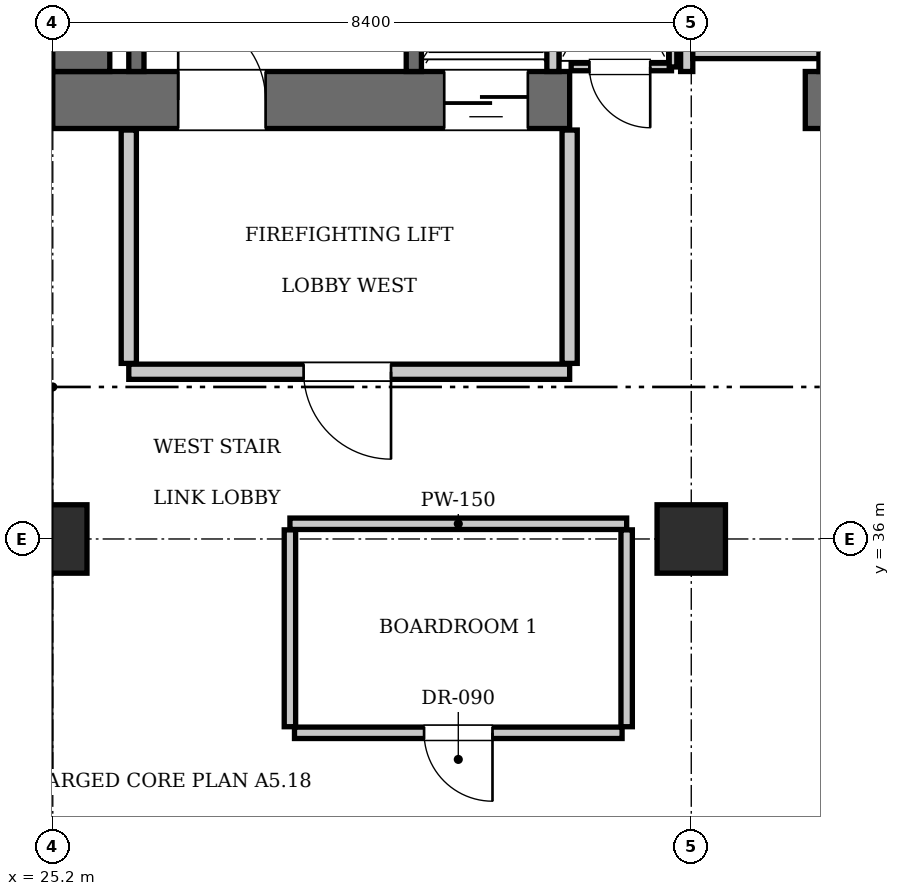
"""IFC4 building model, lengths in metres.
Left out: names, types, materials, properties, quantities, classifications, styles, units other than length and angle.
Written with IfcOpenShell. Run it as: python <this file> out.ifc"""

import sys

from ifc_helpers import new_model, si_unit, direction, frame, frame_2d, origin, origin_2d, place, context, subcontext, project, spatial, rectangle, extrude, element, fill, save


model = new_model("IFC4")
c1 = context("Model", 3, precision=1e-05, world=origin(), true_north=direction((0.0, 1.0)))
c2 = subcontext(c1, "Body", "Model", "MODEL_VIEW")
j1 = project(units=[si_unit("LENGTHUNIT", "METRE"), si_unit("PLANEANGLEUNIT", "RADIAN")], contexts=[c1])
p1 = place(None, origin())
s1 = spatial("IfcSite", under=j1, at=p1, CompositionType="ELEMENT")
p2 = place(p1, origin())
s2 = spatial("IfcBuilding", under=s1, at=p2, CompositionType="ELEMENT")
p3 = place(p2, frame((0.0, 0.0, 212.1)))
s3 = spatial("IfcBuildingStorey", under=s2, at=p3, CompositionType="ELEMENT", Elevation=212.1)
p4 = place(p3, frame((25.2, 41.775, 0.0), z_axis=(0.0, 0.0, 1.0), x_axis=(1.0, 0.0, 0.0)))
e1 = element("IfcWall", 1, at=p4, inside=s3, PredefinedType="SHEAR", context=c2, shape_type="SweptSolid", body=[
    extrude(rectangle(XDim=6.8, YDim=0.75, at=frame_2d((3.4, 0.0))), origin(), (0.0, 0.0, 1.0), 3.85),
])
p5 = place(p4, frame((1.65, 0.0, 0.0)))
e2 = element("IfcOpeningElement", 2, at=p5, cuts=e1, PredefinedType="OPENING", context=c2, shape_type="SweptSolid", body=[
    extrude(rectangle(XDim=1.15, YDim=2.15, at=frame_2d((0.575, 1.075))), frame((0.0, 0.385, 0.0), z_axis=(0.0, -1.0, 0.0), x_axis=(1.0, 0.0, 0.0)), (0.0, 0.0, 1.0), 0.77),
])
p6 = place(p4, frame((5.15, 0.0, 0.0)))
e3 = element("IfcOpeningElement", 3, at=p6, cuts=e1, PredefinedType="OPENING", context=c2, shape_type="SweptSolid", body=[
    extrude(rectangle(XDim=1.1, YDim=2.2, at=frame_2d((0.55, 1.1))), frame((0.0, 0.385, 0.0), z_axis=(0.0, -1.0, 0.0), x_axis=(1.0, 0.0, 0.0)), (0.0, 0.0, 1.0), 0.77),
])
p7 = place(p3, frame((35.1, 41.775, 0.0), z_axis=(0.0, 0.0, 1.0), x_axis=(1.0, 0.0, 0.0)))
e4 = element("IfcWall", 4, at=p7, inside=s3, PredefinedType="SHEAR", context=c2, shape_type="SweptSolid", body=[
    extrude(rectangle(XDim=5.4, YDim=0.75, at=frame_2d((2.7, 0.0))), origin(), (0.0, 0.0, 1.0), 3.85),
])
p8 = place(p3, frame((25.575, 42.15, 0.0), z_axis=(0.0, 0.0, 1.0), x_axis=(0.0, 1.0, 0.0)))
e5 = element("IfcWall", 5, at=p8, inside=s3, PredefinedType="SHEAR", context=c2, shape_type="SweptSolid", body=[
    extrude(rectangle(XDim=1.9, YDim=0.75, at=frame_2d((0.95, 0.0))), origin(), (0.0, 0.0, 1.0), 3.85),
])
for number, where, z_axis, x_axis in (
    (6, (25.2, 36.0, 0.0), (0.0, 0.0, 1.0), (1.0, 0.0, 0.0)),
    (7, (33.6, 36.0, 0.0), (0.0, 0.0, 1.0), (1.0, 0.0, 0.0)),
):
    element("IfcColumn", number, at=place(p3, frame(where, z_axis=z_axis, x_axis=x_axis)), inside=s3, PredefinedType="COLUMN", context=c2, shape_type="SweptSolid", body=[
        extrude(rectangle(XDim=0.9, YDim=0.9, at=origin_2d()), origin(), (0.0, 0.0, 1.0), 3.85),
    ])
p9 = place(p3, frame((29.95, 42.15, 0.0), z_axis=(0.0, 0.0, 1.0), x_axis=(0.0, 1.0, 0.0)))
e8 = element("IfcWall", 8, at=p9, inside=s3, PredefinedType="SOLIDWALL", context=c2, shape_type="SweptSolid", body=[
    extrude(rectangle(XDim=9.0, YDim=0.2, at=frame_2d((4.5, 0.0))), origin(), (0.0, 0.0, 1.0), 3.61),
])
p10 = place(p3, frame((26.3, 42.15, 0.0), z_axis=(0.0, 0.0, 1.0), x_axis=(0.0, 1.0, 0.0)))
e9 = element("IfcWall", 9, at=p10, inside=s3, PredefinedType="SOLIDWALL", context=c2, shape_type="SweptSolid", body=[
    extrude(rectangle(XDim=1.87, YDim=0.2, at=frame_2d((0.935, 0.0))), origin(), (0.0, 0.0, 1.0), 3.61),
])
p11 = place(p3, frame((31.78, 42.15, 0.0), z_axis=(0.0, 0.0, 1.0), x_axis=(0.0, 1.0, 0.0)))
e10 = element("IfcWall", 10, at=p11, inside=s3, PredefinedType="SOLIDWALL", context=c2, shape_type="SweptSolid", body=[
    extrude(rectangle(XDim=2.59, YDim=0.16, at=frame_2d((1.295, 0.0))), origin(), (0.0, 0.0, 1.0), 3.61),
])
for number, where, z_axis, x_axis in (
    (11, (33.54, 42.15, 0.0), (0.0, 0.0, 1.0), (0.0, 1.0, 0.0)),
    (12, (35.36, 42.15, 0.0), (0.0, 0.0, 1.0), (0.0, 1.0, 0.0)),
):
    element("IfcWall", number, at=place(p3, frame(where, z_axis=z_axis, x_axis=x_axis)), inside=s3, PredefinedType="SOLIDWALL", context=c2, shape_type="SweptSolid", body=[
        extrude(rectangle(XDim=2.25, YDim=0.16, at=frame_2d((1.125, 0.0))), origin(), (0.0, 0.0, 1.0), 3.61),
    ])
p12 = place(p3, frame((33.62, 42.4, 0.0), z_axis=(0.0, 0.0, 1.0), x_axis=(1.0, 0.0, 0.0)))
e13 = element("IfcWall", 13, at=p12, inside=s3, PredefinedType="SOLIDWALL", context=c2, shape_type="SweptSolid", body=[
    extrude(rectangle(XDim=1.66, YDim=0.16, at=frame_2d((0.83, 0.0))), origin(), (0.0, 0.0, 1.0), 3.61),
])
p13 = place(p3, frame((26.2, 38.2, 0.0), z_axis=(0.0, 0.0, 1.0), x_axis=(1.0, 0.0, 0.0)))
e14 = element("IfcWall", 14, at=p13, inside=s3, PredefinedType="PARTITIONING", context=c2, shape_type="SweptSolid", body=[
    extrude(rectangle(XDim=5.8, YDim=0.2, at=frame_2d((2.9, 0.0))), origin(), (0.0, 0.0, 1.0), 3.61),
])
p14 = place(p13, frame((2.3, 0.0, 0.0)))
e15 = element("IfcOpeningElement", 15, at=p14, cuts=e14, PredefinedType="OPENING", context=c2, shape_type="SweptSolid", body=[
    extrude(rectangle(XDim=1.15, YDim=2.15, at=frame_2d((0.575, 1.075))), frame((0.0, 0.11, 0.0), z_axis=(0.0, -1.0, 0.0), x_axis=(1.0, 0.0, 0.0)), (0.0, 0.0, 1.0), 0.22),
])
for number, where, z_axis, x_axis in (
    (16, (26.2, 38.31, 0.0), (0.0, 0.0, 1.0), (0.0, 1.0, 0.0)),
    (17, (32.0, 38.31, 0.0), (0.0, 0.0, 1.0), (0.0, 1.0, 0.0)),
):
    element("IfcWall", number, at=place(p3, frame(where, z_axis=z_axis, x_axis=x_axis)), inside=s3, PredefinedType="PARTITIONING", context=c2, shape_type="SweptSolid", body=[
        extrude(rectangle(XDim=3.07, YDim=0.2, at=frame_2d((1.535, 0.0))), origin(), (0.0, 0.0, 1.0), 3.61),
    ])
p15 = place(p3, frame((32.02, 42.21, 0.0), z_axis=(0.0, 0.0, 1.0), x_axis=(1.0, 0.0, 0.0)))
e18 = element("IfcWall", 18, at=p15, inside=s3, PredefinedType="PARTITIONING", context=c2, shape_type="SweptSolid", body=[
    extrude(rectangle(XDim=1.32, YDim=0.1, at=frame_2d((0.66, 0.0))), origin(), (0.0, 0.0, 1.0), 3.61),
])
p16 = place(p15, frame((0.24, 0.0, 0.0)))
e19 = element("IfcOpeningElement", 19, at=p16, cuts=e18, PredefinedType="OPENING", context=c2, shape_type="SweptSolid", body=[
    extrude(rectangle(XDim=0.8, YDim=2.05, at=frame_2d((0.4, 1.025))), frame((0.0, 0.06, 0.0), z_axis=(0.0, -1.0, 0.0), x_axis=(1.0, 0.0, 0.0)), (0.0, 0.0, 1.0), 0.12),
])
p17 = place(p3, frame((33.36, 42.21, 0.0), z_axis=(0.0, 0.0, 1.0), x_axis=(0.0, 1.0, 0.0)))
e20 = element("IfcWall", 20, at=p17, inside=s3, PredefinedType="PARTITIONING", context=c2, shape_type="SweptSolid", body=[
    extrude(rectangle(XDim=2.73, YDim=0.1, at=frame_2d((1.365, 0.0))), origin(), (0.0, 0.0, 1.0), 3.61),
])
p18 = place(p3, frame((28.32, 36.2, 0.0), z_axis=(0.0, 0.0, 1.0), x_axis=(1.0, 0.0, 0.0)))
e21 = element("IfcWall", 21, at=p18, inside=s3, PredefinedType="PARTITIONING", context=c2, shape_type="SweptSolid", body=[
    extrude(rectangle(XDim=4.43, YDim=0.15, at=frame_2d((2.215, 0.0))), origin(), (0.0, 0.0, 1.0), 3.61),
])
for number, where, z_axis, x_axis in (
    (22, (28.32, 33.53, 0.0), (0.0, 0.0, 1.0), (0.0, 1.0, 0.0)),
    (23, (32.75, 33.53, 0.0), (0.0, 0.0, 1.0), (0.0, 1.0, 0.0)),
):
    element("IfcWall", number, at=place(p3, frame(where, z_axis=z_axis, x_axis=x_axis)), inside=s3, PredefinedType="PARTITIONING", context=c2, shape_type="SweptSolid", body=[
        extrude(rectangle(XDim=2.59, YDim=0.15, at=frame_2d((1.295, 0.0))), origin(), (0.0, 0.0, 1.0), 3.61),
    ])
p19 = place(p3, frame((28.38, 33.45, 0.0), z_axis=(0.0, 0.0, 1.0), x_axis=(1.0, 0.0, 0.0)))
e24 = element("IfcWall", 24, at=p19, inside=s3, PredefinedType="PARTITIONING", context=c2, shape_type="SweptSolid", body=[
    extrude(rectangle(XDim=4.31, YDim=0.15, at=frame_2d((2.155, 0.0))), origin(), (0.0, 0.0, 1.0), 3.61),
])
p20 = place(p19, frame((1.705, 0.0, 0.0)))
e25 = element("IfcOpeningElement", 25, at=p20, cuts=e24, PredefinedType="OPENING", context=c2, shape_type="SweptSolid", body=[
    extrude(rectangle(XDim=0.9, YDim=2.1, at=frame_2d((0.45, 1.05))), frame((0.0, 0.085, 0.0), z_axis=(0.0, -1.0, 0.0), x_axis=(1.0, 0.0, 0.0)), (0.0, 0.0, 1.0), 0.17),
])
p21 = place(p5, origin())
e26 = element("IfcDoor", 26, at=p21, inside=s3, OperationType="SINGLE_SWING_LEFT", PredefinedType="DOOR", context=c2, shape_type="SweptSolid", body=[
    extrude(rectangle(XDim=1.15, YDim=2.15, at=frame_2d((0.575, 1.075))), frame((0.0, 0.025, 0.0), z_axis=(0.0, -1.0, 0.0), x_axis=(1.0, 0.0, 0.0)), (0.0, 0.0, 1.0), 0.05),
])
fill(e2, e26)
p22 = place(p6, frame((1.1, 0.0, 0.0), z_axis=(0.0, 0.0, 1.0), x_axis=(-1.0, 0.0, 0.0)))
e27 = element("IfcDoor", 27, at=p22, inside=s3, OperationType="SLIDING_TO_LEFT", PredefinedType="DOOR", context=c2, shape_type="SweptSolid", body=[
    extrude(rectangle(XDim=1.1, YDim=2.2, at=frame_2d((0.55, 1.1))), frame((0.0, 0.025, 0.0), z_axis=(0.0, -1.0, 0.0), x_axis=(1.0, 0.0, 0.0)), (0.0, 0.0, 1.0), 0.05),
])
fill(e3, e27)
p23 = place(p14, frame((1.15, 0.0, 0.0), z_axis=(0.0, 0.0, 1.0), x_axis=(-1.0, 0.0, 0.0)))
e28 = element("IfcDoor", 28, at=p23, inside=s3, OperationType="SINGLE_SWING_LEFT", PredefinedType="DOOR", context=c2, shape_type="SweptSolid", body=[
    extrude(rectangle(XDim=1.15, YDim=2.15, at=frame_2d((0.575, 1.075))), frame((0.0, 0.025, 0.0), z_axis=(0.0, -1.0, 0.0), x_axis=(1.0, 0.0, 0.0)), (0.0, 0.0, 1.0), 0.05),
])
fill(e15, e28)
p24 = place(p16, frame((0.8, 0.0, 0.0), z_axis=(0.0, 0.0, 1.0), x_axis=(-1.0, 0.0, 0.0)))
e29 = element("IfcDoor", 29, at=p24, inside=s3, OperationType="SINGLE_SWING_LEFT", PredefinedType="DOOR", context=c2, shape_type="SweptSolid", body=[
    extrude(rectangle(XDim=0.8, YDim=2.05, at=frame_2d((0.4, 1.025))), frame((0.0, 0.025, 0.0), z_axis=(0.0, -1.0, 0.0), x_axis=(1.0, 0.0, 0.0)), (0.0, 0.0, 1.0), 0.05),
])
fill(e19, e29)
p25 = place(p20, frame((0.9, 0.0, 0.0), z_axis=(0.0, 0.0, 1.0), x_axis=(-1.0, 0.0, 0.0)))
e30 = element("IfcDoor", 30, at=p25, inside=s3, OperationType="SINGLE_SWING_LEFT", PredefinedType="DOOR", context=c2, shape_type="SweptSolid", body=[
    extrude(rectangle(XDim=0.9, YDim=2.1, at=frame_2d((0.45, 1.05))), frame((0.0, 0.025, 0.0), z_axis=(0.0, -1.0, 0.0), x_axis=(1.0, 0.0, 0.0)), (0.0, 0.0, 1.0), 0.05),
])
fill(e25, e30)
save(model, sys.argv[1])
